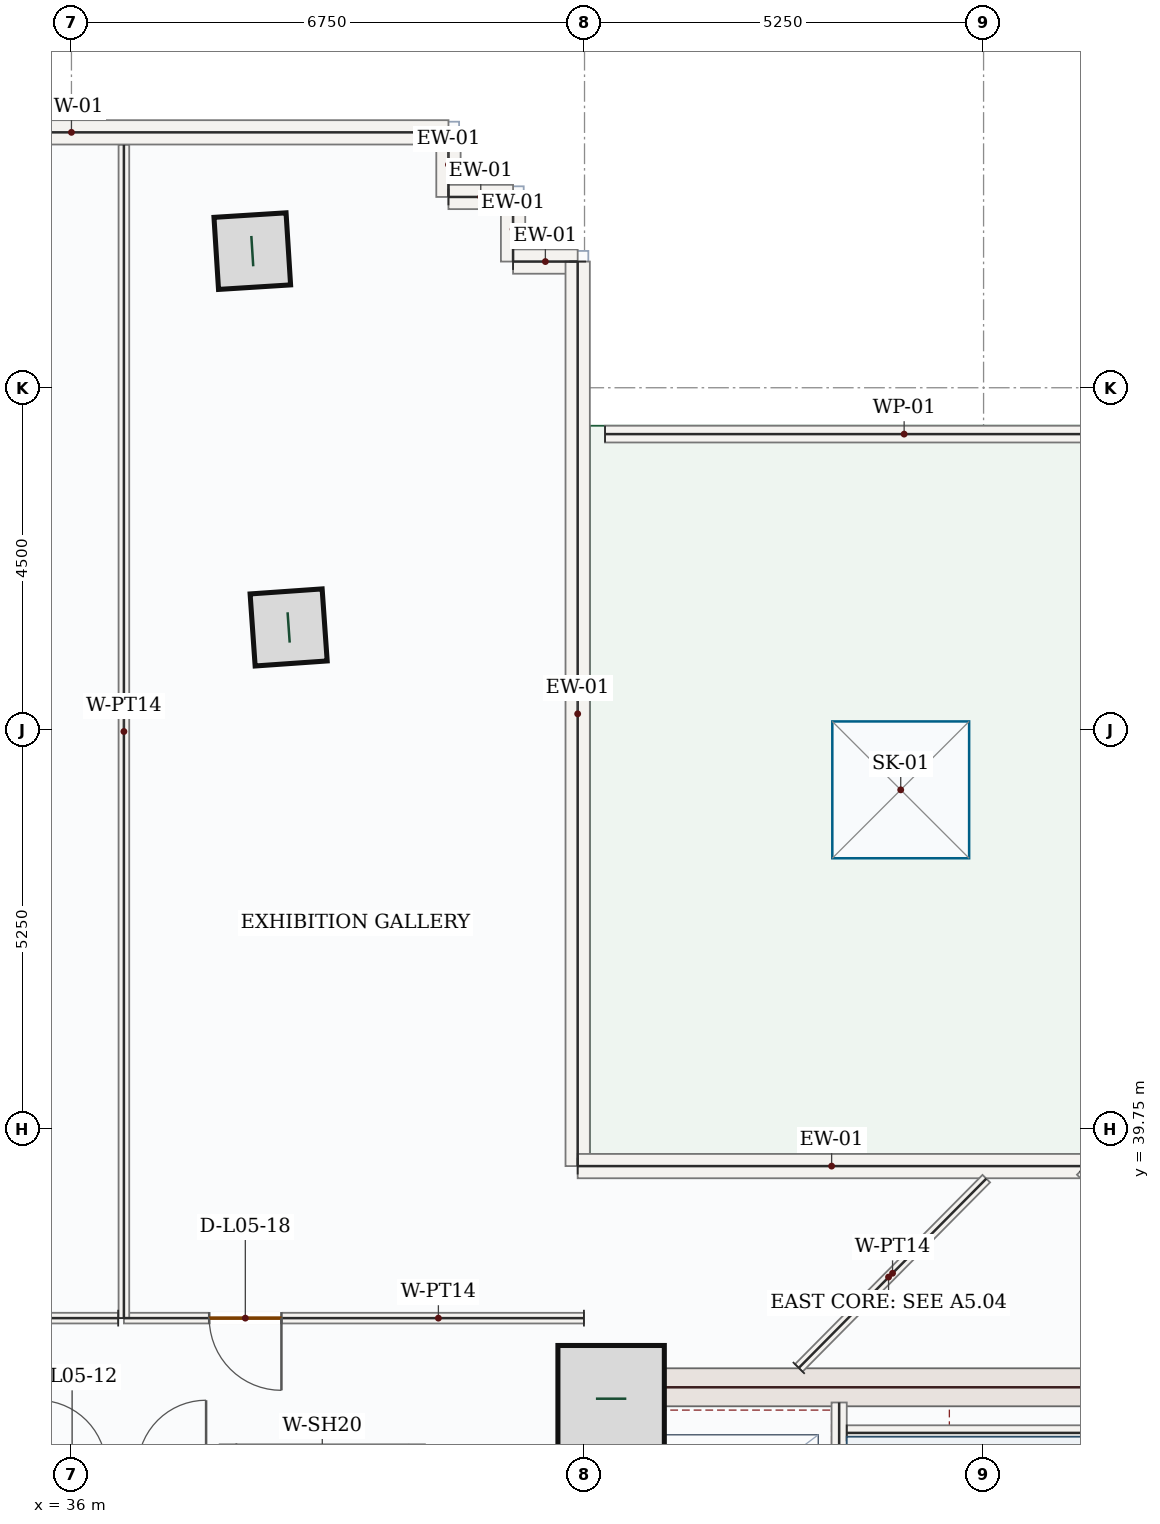
"""IFC4 building model, lengths in metres.
Left out: names, types, materials, properties, quantities, classifications, styles, units other than length and angle.
Written with IfcOpenShell. Run it as: python <this file> out.ifc"""

import sys

from ifc_helpers import new_model, si_unit, direction, frame, frame_2d, origin, origin_2d, place, context, subcontext, project, spatial, rectangle, hollow_rectangle, extrude, source, transform, mapped, element, fill, save


model = new_model("IFC4")
c1 = context("Model", 3, precision=1e-05, world=origin(), true_north=direction((0.0, 1.0)))
c2 = subcontext(c1, "Body", "Model", "MODEL_VIEW")
j1 = project(units=[si_unit("LENGTHUNIT", "METRE"), si_unit("PLANEANGLEUNIT", "RADIAN")], contexts=[c1])
p1 = place(None, origin())
s1 = spatial("IfcSite", under=j1, at=p1, CompositionType="ELEMENT")
p2 = place(p1, origin())
s2 = spatial("IfcBuilding", under=s1, at=p2, CompositionType="ELEMENT")
p3 = place(p2, frame((0.0, 0.0, 29.1)))
s3 = spatial("IfcBuildingStorey", under=s2, at=p3, CompositionType="ELEMENT", Elevation=29.1)
p4 = place(p3, frame((43.0, 28.05, 0.0), z_axis=(0.0, 0.0, 1.0), x_axis=(0.0, 1.0, 0.0)))
e1 = element("IfcWall", 1, at=p4, inside=s3, PredefinedType="SHEAR", context=c2, shape_type="SweptSolid", body=[
    extrude(rectangle(XDim=8.55, YDim=0.5, at=frame_2d((4.275, 0.0))), origin(), (0.0, 0.0, 1.0), 3.95),
])
p5 = place(p4, frame((1.5, 0.0, 0.0)))
e2 = element("IfcOpeningElement", 2, at=p5, cuts=e1, PredefinedType="OPENING", context=c2, shape_type="SweptSolid", body=[
    extrude(rectangle(XDim=1.1, YDim=2.2, at=frame_2d((0.55, 1.1))), frame((0.0, 0.26, 0.0), z_axis=(0.0, -1.0, 0.0), x_axis=(1.0, 0.0, 0.0)), (0.0, 0.0, 1.0), 0.52),
])
m1 = source(origin(), c2, "Body", "SweptSolid", [
    extrude(rectangle(XDim=7.0, YDim=0.5, at=frame_2d((3.5, 0.0))), origin(), (0.0, 0.0, 1.0), 3.95),
])
p6 = place(p3, frame((43.25, 36.35, 0.0), z_axis=(0.0, 0.0, 1.0), x_axis=(1.0, 0.0, 0.0)))
e3 = element("IfcWall", 3, at=p6, inside=s3, PredefinedType="SHEAR", context=c2, shape_type="MappedRepresentation", body=[
    mapped(m1, transform((0.0, 0.0, 0.0), x_axis=(1.0, 0.0, 0.0), y_axis=(0.0, 1.0, 0.0), z_axis=(0.0, 0.0, 1.0), scale=1.0)),
])
m2 = source(origin(), c2, "Body", "SweptSolid", [
    extrude(rectangle(XDim=1.4, YDim=1.4, at=origin_2d()), origin(), (0.0, 0.0, 1.0), 4.2),
])
p7 = place(p3, frame((43.1, 36.2, 0.0), z_axis=(0.0, 0.0, 1.0), x_axis=(1.0, 0.0, 0.0)))
e4 = element("IfcColumn", 4, at=p7, inside=s3, PredefinedType="COLUMN", context=c2, shape_type="MappedRepresentation", body=[
    mapped(m2, transform((0.0, 0.0, 0.0), x_axis=(1.0, 0.0, 0.0), y_axis=(0.0, 1.0, 0.0), z_axis=(0.0, 0.0, 1.0), scale=1.0)),
])
m3 = source(origin(), c2, "Body", "SweptSolid", [
    extrude(hollow_rectangle(XDim=0.95, YDim=0.95, WallThickness=0.05, at=origin_2d()), origin(), (0.0, 0.0, 1.0), 4.2),
])
for number, where, z_axis, x_axis in (
    (5, (38.857, 46.346, 0.0), (0.0, 0.0, 1.0), (-0.07, 0.998, 0.0)),
    (6, (38.379, 51.297, 0.0), (0.0, 0.0, 1.0), (-0.063, 0.998, 0.0)),
):
    element("IfcColumn", number, at=place(p3, frame(where, z_axis=z_axis, x_axis=x_axis)), inside=s3, PredefinedType="COLUMN", context=c2, shape_type="MappedRepresentation", body=[
        mapped(m3, transform((0.0, 0.0, 0.0), x_axis=(1.0, 0.0, 0.0), y_axis=(0.0, 1.0, 0.0), z_axis=(0.0, 0.0, 1.0), scale=1.0)),
    ])
m4 = source(origin(), c2, "Body", "SweptSolid", [
    extrude(rectangle(XDim=7.87, YDim=0.22, at=frame_2d((3.935, 0.0))), origin(), (0.0, 0.0, 1.0), 1.2),
])
p8 = place(p3, frame((43.02, 48.89, 0.0), z_axis=(0.0, 0.0, 1.0), x_axis=(1.0, 0.0, 0.0)))
e7 = element("IfcWall", 7, at=p8, inside=s3, PredefinedType="PARAPET", context=c2, shape_type="MappedRepresentation", body=[
    mapped(m4, transform((0.0, 0.0, 0.0), x_axis=(1.0, 0.0, 0.0), y_axis=(0.0, 1.0, 0.0), z_axis=(0.0, 0.0, 1.0), scale=1.0)),
])
m5 = source(origin(), c2, "Body", "SweptSolid", [
    extrude(rectangle(XDim=9.92, YDim=0.32, at=frame_2d((4.96, 0.0))), origin(), (0.0, 0.0, 1.0), 3.95),
])
p9 = place(p3, frame((31.04, 52.86, 0.0), z_axis=(0.0, 0.0, 1.0), x_axis=(1.0, 0.0, 0.0)))
e8 = element("IfcWall", 8, at=p9, inside=s3, PredefinedType="SOLIDWALL", context=c2, shape_type="MappedRepresentation", body=[
    mapped(m5, transform((0.0, 0.0, 0.0), x_axis=(1.0, 0.0, 0.0), y_axis=(0.0, 1.0, 0.0), z_axis=(0.0, 0.0, 1.0), scale=1.0)),
])
m6 = source(origin(), c2, "Body", "SweptSolid", [
    extrude(rectangle(XDim=0.85, YDim=0.32, at=frame_2d((0.425, 0.0))), origin(), (0.0, 0.0, 1.0), 3.95),
])
for number, where, z_axis, x_axis in (
    (9, (40.96, 52.86, 0.0), (0.0, 0.0, 1.0), (0.0, -1.0, 0.0)),
    (10, (40.96, 52.01, 0.0), (0.0, 0.0, 1.0), (1.0, 0.0, 0.0)),
    (11, (41.81, 52.01, 0.0), (0.0, 0.0, 1.0), (0.0, -1.0, 0.0)),
):
    element("IfcWall", number, at=place(p3, frame(where, z_axis=z_axis, x_axis=x_axis)), inside=s3, PredefinedType="SOLIDWALL", context=c2, shape_type="MappedRepresentation", body=[
        mapped(m6, transform((0.0, 0.0, 0.0), x_axis=(1.0, 0.0, 0.0), y_axis=(0.0, 1.0, 0.0), z_axis=(0.0, 0.0, 1.0), scale=1.0)),
    ])
m7 = source(origin(), c2, "Body", "SweptSolid", [
    extrude(rectangle(XDim=0.85, YDim=0.32, at=frame_2d((0.425, 0.0))), origin(), (0.0, 0.0, 1.0), 3.95),
])
p10 = place(p3, frame((41.81, 51.16, 0.0), z_axis=(0.0, 0.0, 1.0), x_axis=(1.0, 0.0, 0.0)))
e12 = element("IfcWall", 12, at=p10, inside=s3, PredefinedType="SOLIDWALL", context=c2, shape_type="MappedRepresentation", body=[
    mapped(m7, transform((0.0, 0.0, 0.0), x_axis=(1.0, 0.0, 0.0), y_axis=(0.0, 1.0, 0.0), z_axis=(0.0, 0.0, 1.0), scale=1.0)),
])
m8 = source(origin(), c2, "Body", "SweptSolid", [
    extrude(rectangle(XDim=11.9, YDim=0.32, at=frame_2d((5.95, 0.0))), origin(), (0.0, 0.0, 1.0), 3.95),
])
p11 = place(p3, frame((42.66, 51.16, 0.0), z_axis=(0.0, 0.0, 1.0), x_axis=(0.0, -1.0, 0.0)))
e13 = element("IfcWall", 13, at=p11, inside=s3, PredefinedType="SOLIDWALL", context=c2, shape_type="MappedRepresentation", body=[
    mapped(m8, transform((0.0, 0.0, 0.0), x_axis=(1.0, 0.0, 0.0), y_axis=(0.0, 1.0, 0.0), z_axis=(0.0, 0.0, 1.0), scale=1.0)),
])
m9 = source(origin(), c2, "Body", "SweptSolid", [
    extrude(rectangle(XDim=6.682, YDim=0.32, at=frame_2d((3.341, 0.0))), origin(), (0.0, 0.0, 1.0), 3.95),
])
p12 = place(p3, frame((42.66, 39.26, 0.0), z_axis=(0.0, 0.0, 1.0), x_axis=(1.0, 0.0, 0.0)))
e14 = element("IfcWall", 14, at=p12, inside=s3, PredefinedType="SOLIDWALL", context=c2, shape_type="MappedRepresentation", body=[
    mapped(m9, transform((0.0, 0.0, 0.0), x_axis=(1.0, 0.0, 0.0), y_axis=(0.0, 1.0, 0.0), z_axis=(0.0, 0.0, 1.0), scale=1.0)),
])
m10 = source(origin(), c2, "Body", "SweptSolid", [
    extrude(rectangle(XDim=5.258, YDim=0.32, at=frame_2d((2.629, 0.0))), origin(), (0.0, 0.0, 1.0), 3.95),
])
p13 = place(p3, frame((49.342, 39.26, 0.0), z_axis=(0.0, 0.0, 1.0), x_axis=(0.707106781187, -0.707106781187, 0.0)))
e15 = element("IfcWall", 15, at=p13, inside=s3, PredefinedType="SOLIDWALL", context=c2, shape_type="MappedRepresentation", body=[
    mapped(m10, transform((0.0, 0.0, 0.0), x_axis=(1.0, 0.0, 0.0), y_axis=(0.0, 1.0, 0.0), z_axis=(0.0, 0.0, 1.0), scale=1.0)),
])
p14 = place(p3, frame((46.1, 28.15, 0.0), z_axis=(0.0, 0.0, 1.0), x_axis=(0.0, 1.0, 0.0)))
e16 = element("IfcWall", 16, at=p14, inside=s3, PredefinedType="SOLIDWALL", context=c2, shape_type="SweptSolid", body=[
    extrude(rectangle(XDim=8.0, YDim=0.2, at=frame_2d((4.0, 0.0))), origin(), (0.0, 0.0, 1.0), 3.95),
])
p15 = place(p14, frame((0.4, 0.0, 0.0)))
e17 = element("IfcOpeningElement", 17, at=p15, cuts=e16, PredefinedType="OPENING", context=c2, shape_type="SweptSolid", body=[
    extrude(rectangle(XDim=1.05, YDim=2.15, at=frame_2d((0.525, 1.075))), frame((0.0, 0.11, 0.0), z_axis=(0.0, -1.0, 0.0), x_axis=(1.0, 0.0, 0.0)), (0.0, 0.0, 1.0), 0.22),
])
m11 = source(origin(), c2, "Body", "SweptSolid", [
    extrude(rectangle(XDim=3.25, YDim=0.2, at=frame_2d((1.625, 0.0))), origin(), (0.0, 0.0, 1.0), 3.95),
])
p16 = place(p3, frame((46.2, 35.75, 0.0), z_axis=(0.0, 0.0, 1.0), x_axis=(1.0, 0.0, 0.0)))
e18 = element("IfcWall", 18, at=p16, inside=s3, PredefinedType="SOLIDWALL", context=c2, shape_type="MappedRepresentation", body=[
    mapped(m11, transform((0.0, 0.0, 0.0), x_axis=(1.0, 0.0, 0.0), y_axis=(0.0, 1.0, 0.0), z_axis=(0.0, 0.0, 1.0), scale=1.0)),
])
m12 = source(origin(), c2, "Body", "SweptSolid", [
    extrude(rectangle(XDim=2.4, YDim=0.2, at=frame_2d((1.2, 0.0))), origin(), (0.0, 0.0, 1.0), 3.95),
])
for number, where, z_axis, x_axis in (
    (19, (38.05, 33.2, 0.0), (0.0, 0.0, 1.0), (0.0, 1.0, 0.0)),
    (20, (40.55, 33.2, 0.0), (0.0, 0.0, 1.0), (0.0, 1.0, 0.0)),
):
    element("IfcWall", number, at=place(p3, frame(where, z_axis=z_axis, x_axis=x_axis)), inside=s3, PredefinedType="SOLIDWALL", context=c2, shape_type="MappedRepresentation", body=[
        mapped(m12, transform((0.0, 0.0, 0.0), x_axis=(1.0, 0.0, 0.0), y_axis=(0.0, 1.0, 0.0), z_axis=(0.0, 0.0, 1.0), scale=1.0)),
    ])
m13 = source(origin(), c2, "Body", "SweptSolid", [
    extrude(rectangle(XDim=3.505, YDim=0.14, at=frame_2d((1.752, 0.0))), origin(), (0.0, 0.0, 1.0), 3.95),
])
p17 = place(p3, frame((45.569, 36.605, 0.0), z_axis=(0.0, 0.0, 1.0), x_axis=(0.703790445361, 0.710407635811, 0.0)))
e21 = element("IfcWall", 21, at=p17, inside=s3, PredefinedType="PARTITIONING", context=c2, shape_type="MappedRepresentation", body=[
    mapped(m13, transform((0.0, 0.0, 0.0), x_axis=(1.0, 0.0, 0.0), y_axis=(0.0, 1.0, 0.0), z_axis=(0.0, 0.0, 1.0), scale=1.0)),
])
p18 = place(p3, frame((42.742, 37.26, 0.0), z_axis=(0.0, 0.0, 1.0), x_axis=(-0.999999999186, 4.0337219e-05, 0.0)))
e22 = element("IfcWall", 22, at=p18, inside=s3, PredefinedType="PARTITIONING", context=c2, shape_type="SweptSolid", body=[
    extrude(rectangle(XDim=6.052, YDim=0.14, at=frame_2d((3.026, 0.0))), origin(), (0.0, 0.0, 1.0), 3.95),
])
p19 = place(p18, frame((3.98, 0.0, 0.0)))
e23 = element("IfcOpeningElement", 23, at=p19, cuts=e22, PredefinedType="OPENING", context=c2, shape_type="SweptSolid", body=[
    extrude(rectangle(XDim=0.95, YDim=2.15, at=frame_2d((0.475, 1.075))), frame((0.0, 0.08, 0.0), z_axis=(0.0, -1.0, 0.0), x_axis=(1.0, 0.0, 0.0)), (0.0, 0.0, 1.0), 0.16),
])
m14 = source(origin(), c2, "Body", "SweptSolid", [
    extrude(rectangle(XDim=15.435, YDim=0.14, at=frame_2d((7.718, 0.0))), origin(), (0.0, 0.0, 1.0), 3.95),
])
p20 = place(p3, frame((36.69, 37.26, 0.0), z_axis=(0.0, 0.0, 1.0), x_axis=(0.0, 1.0, 0.0)))
e24 = element("IfcWall", 24, at=p20, inside=s3, PredefinedType="PARTITIONING", context=c2, shape_type="MappedRepresentation", body=[
    mapped(m14, transform((0.0, 0.0, 0.0), x_axis=(1.0, 0.0, 0.0), y_axis=(0.0, 1.0, 0.0), z_axis=(0.0, 0.0, 1.0), scale=1.0)),
])
p21 = place(p3, frame((36.615, 37.26, 0.0), z_axis=(0.0, 0.0, 1.0), x_axis=(-0.999999999449, -3.3182904e-05, 0.0)))
e25 = element("IfcWall", 25, at=p21, inside=s3, PredefinedType="PARTITIONING", context=c2, shape_type="SweptSolid", body=[
    extrude(rectangle(XDim=7.357, YDim=0.14, at=frame_2d((3.679, 0.0))), origin(), (0.0, 0.0, 1.0), 3.95),
])
p22 = place(p21, frame((1.41, 0.0, 0.0)))
e26 = element("IfcOpeningElement", 26, at=p22, cuts=e25, PredefinedType="OPENING", context=c2, shape_type="SweptSolid", body=[
    extrude(rectangle(XDim=0.95, YDim=2.15, at=frame_2d((0.475, 1.075))), frame((0.0, 0.08, 0.0), z_axis=(0.0, -1.0, 0.0), x_axis=(1.0, 0.0, 0.0)), (0.0, 0.0, 1.0), 0.16),
])
p23 = place(p3, frame((0.0, 0.0, -0.22)))
p24 = place(p23, frame((46.91, 44.21, 0.0)))
p25 = place(p24, frame((0.0, 0.0, 0.22)))
e27 = element("IfcWindow", 27, at=p25, inside=s3, PartitioningType="SINGLE_PANEL", PredefinedType="SKYLIGHT", context=c2, shape_type="SweptSolid", body=[
    extrude(rectangle(XDim=1.8, YDim=1.8, at=origin_2d()), origin(), (0.0, 0.0, 1.0), 0.05),
])
m15 = source(origin(), c2, "Body", "SweptSolid", [
    extrude(rectangle(XDim=0.95, YDim=2.15, at=frame_2d((0.475, 1.075))), frame((0.0, 0.025, 0.0), z_axis=(0.0, -1.0, 0.0), x_axis=(1.0, 0.0, 0.0)), (0.0, 0.0, 1.0), 0.05),
])
p26 = place(p19, origin())
e28 = element("IfcDoor", 28, at=p26, inside=s3, OperationType="SINGLE_SWING_LEFT", PredefinedType="DOOR", context=c2, shape_type="MappedRepresentation", body=[
    mapped(m15, transform((0.0, 0.0, 0.0), x_axis=(1.0, 0.0, 0.0), y_axis=(0.0, 1.0, 0.0), z_axis=(0.0, 0.0, 1.0), scale=1.0)),
])
fill(e23, e28)
save(model, sys.argv[1])
